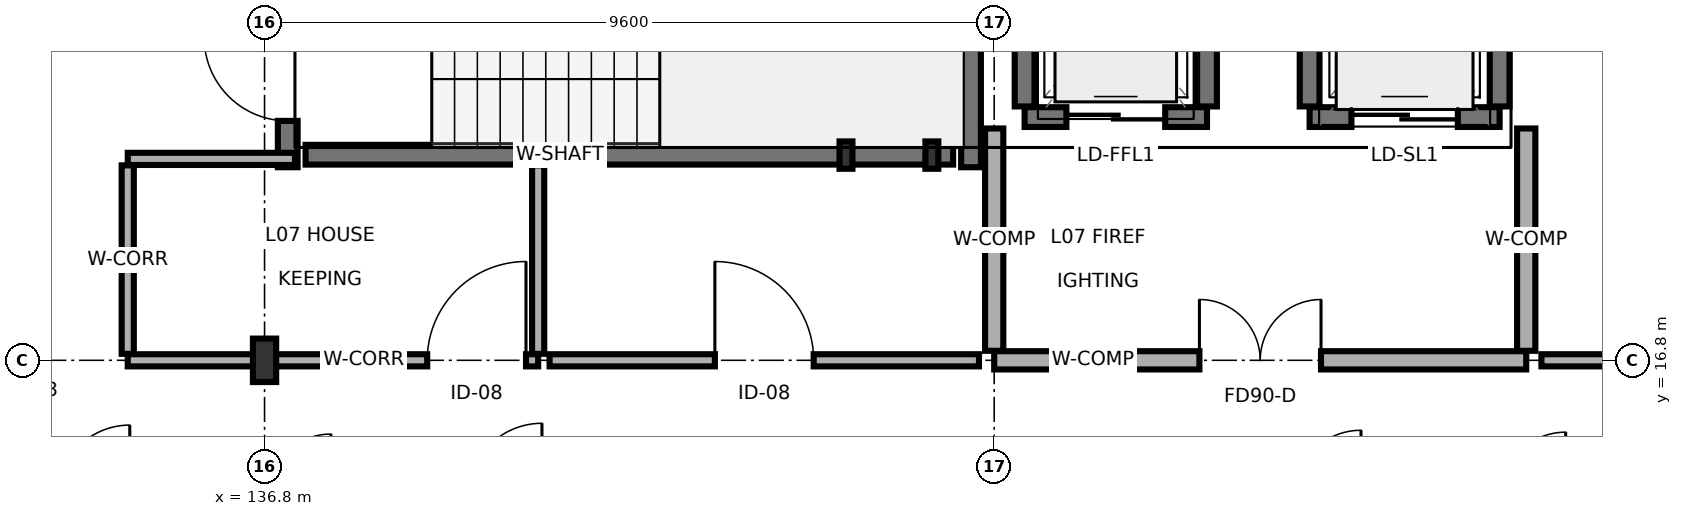
"""IFC4 building model, lengths in metres.
Left out: names, types, materials, properties, quantities, classifications, styles, units other than length and angle.
Written with IfcOpenShell. Run it as: python <this file> out.ifc"""

import sys

from ifc_helpers import new_model, si_unit, direction, frame, frame_2d, origin, origin_2d, place, context, subcontext, project, spatial, rectangle, i_section, extrude, element, fill, save


model = new_model("IFC4")
c1 = context("Model", 3, precision=1e-05, world=origin(), true_north=direction((0.0, 1.0)))
c2 = subcontext(c1, "Body", "Model", "MODEL_VIEW")
j1 = project(units=[si_unit("LENGTHUNIT", "METRE"), si_unit("PLANEANGLEUNIT", "RADIAN")], contexts=[c1])
p1 = place(None, origin())
s1 = spatial("IfcSite", under=j1, at=p1, CompositionType="ELEMENT")
p2 = place(p1, origin())
s2 = spatial("IfcBuilding", under=s1, at=p2, CompositionType="ELEMENT")
p3 = place(p2, frame((0.0, 0.0, 24.9)))
s3 = spatial("IfcBuildingStorey", under=s2, at=p3, CompositionType="ELEMENT", Elevation=24.9)
p4 = place(p3, frame((136.8, 16.8, 0.0), z_axis=(0.0, 0.0, 1.0), x_axis=(1.0, 0.0, 0.0)))
e1 = element("IfcColumn", 1, at=p4, inside=s3, PredefinedType="COLUMN", context=c2, shape_type="SweptSolid", body=[
    extrude(i_section(OverallWidth=0.306, OverallDepth=0.572, WebThickness=0.021, FlangeThickness=0.04, FilletRadius=0.027, at=origin_2d()), origin(), (0.0, 0.0, 1.0), 3.4),
])
for number, where, z_axis, x_axis in (
    (2, (144.45, 19.5, 0.0), (0.0, 0.0, 1.0), (1.0, 0.0, 0.0)),
    (3, (145.58, 19.5, 0.0), (0.0, 0.0, 1.0), (1.0, 0.0, 0.0)),
):
    element("IfcColumn", number, at=place(p3, frame(where, z_axis=z_axis, x_axis=x_axis)), inside=s3, PredefinedType="PILASTER", context=c2, shape_type="SweptSolid", body=[
        extrude(i_section(OverallWidth=0.17, OverallDepth=0.36, WebThickness=0.008, FlangeThickness=0.013, FilletRadius=0.018, at=origin_2d()), origin(), (0.0, 0.0, 1.0), 3.4),
    ])
p5 = place(p3, frame((137.105, 19.34, 0.0), z_axis=(0.0, 0.0, 1.0), x_axis=(0.0, 1.0, 0.0)))
e4 = element("IfcWall", 4, at=p5, inside=s3, PredefinedType="SHEAR", context=c2, shape_type="SweptSolid", body=[
    extrude(rectangle(XDim=4.27, YDim=0.26, at=frame_2d((2.135, 0.0))), origin(), (0.0, 0.0, 1.0), 3.19),
])
p6 = place(p5, frame((0.61, 0.0, 0.0)))
e5 = element("IfcOpeningElement", 5, at=p6, cuts=e4, PredefinedType="OPENING", context=c2, shape_type="SweptSolid", body=[
    extrude(rectangle(XDim=1.1, YDim=2.2, at=frame_2d((0.55, 1.1))), frame((0.0, 0.14, 0.0), z_axis=(0.0, -1.0, 0.0), x_axis=(1.0, 0.0, 0.0)), (0.0, 0.0, 1.0), 0.28),
])
p7 = place(p3, frame((146.095, 19.34, 0.0), z_axis=(0.0, 0.0, 1.0), x_axis=(0.0, 1.0, 0.0)))
e6 = element("IfcWall", 6, at=p7, inside=s3, PredefinedType="SHEAR", context=c2, shape_type="SweptSolid", body=[
    extrude(rectangle(XDim=4.27, YDim=0.26, at=frame_2d((2.135, 0.0))), origin(), (0.0, 0.0, 1.0), 3.19),
])
p8 = place(p3, frame((137.34, 19.505, 0.0), z_axis=(0.0, 0.0, 1.0), x_axis=(1.0, 0.0, 0.0)))
e7 = element("IfcWall", 7, at=p8, inside=s3, PredefinedType="SHEAR", context=c2, shape_type="SweptSolid", body=[
    extrude(rectangle(XDim=8.52, YDim=0.26, at=frame_2d((4.26, 0.0))), origin(), (0.0, 0.0, 1.0), 3.19),
])
p9 = place(p3, frame((146.8, 20.0, 0.0), z_axis=(0.0, 0.0, 1.0), x_axis=(1.0, 0.0, 0.0)))
e8 = element("IfcWall", 8, at=p9, inside=s3, PredefinedType="SHEAR", context=c2, shape_type="SweptSolid", body=[
    extrude(rectangle(XDim=2.4, YDim=0.26, at=frame_2d((1.2, 0.0))), origin(), (0.0, 0.0, 1.0), 3.19),
])
p10 = place(p9, frame((0.55, 0.0, 0.0)))
e9 = element("IfcOpeningElement", 9, at=p10, cuts=e8, PredefinedType="OPENING", context=c2, shape_type="SweptSolid", body=[
    extrude(rectangle(XDim=1.3, YDim=2.25, at=frame_2d((0.65, 1.125))), frame((0.0, 0.14, 0.0), z_axis=(0.0, -1.0, 0.0), x_axis=(1.0, 0.0, 0.0)), (0.0, 0.0, 1.0), 0.28),
])
for number, where, z_axis, x_axis in (
    (10, (146.8, 20.14, 0.0), (0.0, 0.0, 1.0), (0.0, 1.0, 0.0)),
    (11, (149.2, 20.14, 0.0), (0.0, 0.0, 1.0), (0.0, 1.0, 0.0)),
):
    element("IfcWall", number, at=place(p3, frame(where, z_axis=z_axis, x_axis=x_axis)), inside=s3, PredefinedType="SHEAR", context=c2, shape_type="SweptSolid", body=[
        extrude(rectangle(XDim=2.52, YDim=0.26, at=frame_2d((1.26, 0.0))), origin(), (0.0, 0.0, 1.0), 3.19),
    ])
p11 = place(p3, frame((150.55, 20.0, 0.0), z_axis=(0.0, 0.0, 1.0), x_axis=(1.0, 0.0, 0.0)))
e12 = element("IfcWall", 12, at=p11, inside=s3, PredefinedType="SHEAR", context=c2, shape_type="SweptSolid", body=[
    extrude(rectangle(XDim=2.5, YDim=0.26, at=frame_2d((1.25, 0.0))), origin(), (0.0, 0.0, 1.0), 3.19),
])
p12 = place(p11, frame((0.55, 0.0, 0.0)))
e13 = element("IfcOpeningElement", 13, at=p12, cuts=e12, PredefinedType="OPENING", context=c2, shape_type="SweptSolid", body=[
    extrude(rectangle(XDim=1.4, YDim=2.3, at=frame_2d((0.7, 1.15))), frame((0.0, 0.14, 0.0), z_axis=(0.0, -1.0, 0.0), x_axis=(1.0, 0.0, 0.0)), (0.0, 0.0, 1.0), 0.28),
])
for number, where, z_axis, x_axis in (
    (14, (150.55, 20.14, 0.0), (0.0, 0.0, 1.0), (0.0, 1.0, 0.0)),
    (15, (153.05, 20.14, 0.0), (0.0, 0.0, 1.0), (0.0, 1.0, 0.0)),
):
    element("IfcWall", number, at=place(p3, frame(where, z_axis=z_axis, x_axis=x_axis)), inside=s3, PredefinedType="SHEAR", context=c2, shape_type="SweptSolid", body=[
        extrude(rectangle(XDim=2.52, YDim=0.26, at=frame_2d((1.26, 0.0))), origin(), (0.0, 0.0, 1.0), 3.19),
    ])
p13 = place(p3, frame((146.4, 16.8, 0.0), z_axis=(0.0, 0.0, 1.0), x_axis=(1.0, 0.0, 0.0)))
e16 = element("IfcWall", 16, at=p13, inside=s3, PredefinedType="SOLIDWALL", context=c2, shape_type="SweptSolid", body=[
    extrude(rectangle(XDim=7.0, YDim=0.24, at=frame_2d((3.5, 0.0))), origin(), (0.0, 0.0, 1.0), 2.725),
])
p14 = place(p13, frame((2.7, 0.0, 0.0)))
e17 = element("IfcOpeningElement", 17, at=p14, cuts=e16, PredefinedType="OPENING", context=c2, shape_type="SweptSolid", body=[
    extrude(rectangle(XDim=1.6, YDim=2.2, at=frame_2d((0.8, 1.1))), frame((0.0, 0.13, 0.0), z_axis=(0.0, -1.0, 0.0), x_axis=(1.0, 0.0, 0.0)), (0.0, 0.0, 1.0), 0.26),
])
for number, where, z_axis, x_axis in (
    (18, (146.4, 16.925, 0.0), (0.0, 0.0, 1.0), (0.0, 1.0, 0.0)),
    (19, (153.4, 16.925, 0.0), (0.0, 0.0, 1.0), (0.0, 1.0, 0.0)),
):
    element("IfcWall", number, at=place(p3, frame(where, z_axis=z_axis, x_axis=x_axis)), inside=s3, PredefinedType="SOLIDWALL", context=c2, shape_type="SweptSolid", body=[
        extrude(rectangle(XDim=2.925, YDim=0.24, at=frame_2d((1.462, 0.0))), origin(), (0.0, 0.0, 1.0), 2.725),
    ])
p15 = place(p3, frame((135.0, 16.8, 0.0), z_axis=(0.0, 0.0, 1.0), x_axis=(1.0, 0.0, 0.0)))
e20 = element("IfcWall", 20, at=p15, inside=s3, PredefinedType="PARTITIONING", context=c2, shape_type="SweptSolid", body=[
    extrude(rectangle(XDim=5.4, YDim=0.16, at=frame_2d((2.7, 0.0))), origin(), (0.0, 0.0, 1.0), 2.725),
])
p16 = place(p15, frame((3.94, 0.0, 0.0)))
e21 = element("IfcOpeningElement", 21, at=p16, cuts=e20, PredefinedType="OPENING", context=c2, shape_type="SweptSolid", body=[
    extrude(rectangle(XDim=1.3, YDim=2.2, at=frame_2d((0.65, 1.1))), frame((0.0, 0.09, 0.0), z_axis=(0.0, -1.0, 0.0), x_axis=(1.0, 0.0, 0.0)), (0.0, 0.0, 1.0), 0.18),
])
for number, where, z_axis, x_axis in (
    (22, (135.0, 16.885, 0.0), (0.0, 0.0, 1.0), (0.0, 1.0, 0.0)),
    (23, (140.4, 16.885, 0.0), (0.0, 0.0, 1.0), (0.0, 1.0, 0.0)),
):
    element("IfcWall", number, at=place(p3, frame(where, z_axis=z_axis, x_axis=x_axis)), inside=s3, PredefinedType="PARTITIONING", context=c2, shape_type="SweptSolid", body=[
        extrude(rectangle(XDim=2.48, YDim=0.16, at=frame_2d((1.24, 0.0))), origin(), (0.0, 0.0, 1.0), 2.725),
    ])
p17 = place(p3, frame((135.0, 19.45, 0.0), z_axis=(0.0, 0.0, 1.0), x_axis=(1.0, 0.0, 0.0)))
e24 = element("IfcWall", 24, at=p17, inside=s3, PredefinedType="PARTITIONING", context=c2, shape_type="SweptSolid", body=[
    extrude(rectangle(XDim=2.2, YDim=0.16, at=frame_2d((1.1, 0.0))), origin(), (0.0, 0.0, 1.0), 2.725),
])
p18 = place(p3, frame((140.55, 16.8, 0.0), z_axis=(0.0, 0.0, 1.0), x_axis=(1.0, 0.0, 0.0)))
e25 = element("IfcWall", 25, at=p18, inside=s3, PredefinedType="PARTITIONING", context=c2, shape_type="SweptSolid", body=[
    extrude(rectangle(XDim=5.65, YDim=0.16, at=frame_2d((2.825, 0.0))), origin(), (0.0, 0.0, 1.0), 2.725),
])
p19 = place(p18, frame((2.175, 0.0, 0.0)))
e26 = element("IfcOpeningElement", 26, at=p19, cuts=e25, PredefinedType="OPENING", context=c2, shape_type="SweptSolid", body=[
    extrude(rectangle(XDim=1.3, YDim=2.2, at=frame_2d((0.65, 1.1))), frame((0.0, 0.09, 0.0), z_axis=(0.0, -1.0, 0.0), x_axis=(1.0, 0.0, 0.0)), (0.0, 0.0, 1.0), 0.18),
])
p20 = place(p3, frame((153.6, 16.8, 0.0), z_axis=(0.0, 0.0, 1.0), x_axis=(1.0, 0.0, 0.0)))
e27 = element("IfcWall", 27, at=p20, inside=s3, PredefinedType="PARTITIONING", context=c2, shape_type="SweptSolid", body=[
    extrude(rectangle(XDim=1.8, YDim=0.16, at=frame_2d((0.9, 0.0))), origin(), (0.0, 0.0, 1.0), 2.725),
])
p21 = place(p6, origin())
e28 = element("IfcDoor", 28, at=p21, inside=s3, OperationType="SINGLE_SWING_RIGHT", PredefinedType="DOOR", context=c2, shape_type="SweptSolid", body=[
    extrude(rectangle(XDim=1.1, YDim=2.2, at=frame_2d((0.55, 1.1))), frame((0.0, 0.025, 0.0), z_axis=(0.0, -1.0, 0.0), x_axis=(1.0, 0.0, 0.0)), (0.0, 0.0, 1.0), 0.05),
])
fill(e5, e28)
p22 = place(p10, origin())
e29 = element("IfcDoor", 29, at=p22, inside=s3, OperationType="SLIDING_TO_RIGHT", PredefinedType="DOOR", context=c2, shape_type="SweptSolid", body=[
    extrude(rectangle(XDim=1.3, YDim=2.25, at=frame_2d((0.65, 1.125))), frame((0.0, 0.025, 0.0), z_axis=(0.0, -1.0, 0.0), x_axis=(1.0, 0.0, 0.0)), (0.0, 0.0, 1.0), 0.05),
])
fill(e9, e29)
p23 = place(p12, origin())
e30 = element("IfcDoor", 30, at=p23, inside=s3, OperationType="SLIDING_TO_LEFT", PredefinedType="DOOR", context=c2, shape_type="SweptSolid", body=[
    extrude(rectangle(XDim=1.4, YDim=2.3, at=frame_2d((0.7, 1.15))), frame((0.0, 0.025, 0.0), z_axis=(0.0, -1.0, 0.0), x_axis=(1.0, 0.0, 0.0)), (0.0, 0.0, 1.0), 0.05),
])
fill(e13, e30)
p24 = place(p14, origin())
e31 = element("IfcDoor", 31, at=p24, inside=s3, OperationType="DOUBLE_DOOR_SINGLE_SWING", PredefinedType="DOOR", context=c2, shape_type="SweptSolid", body=[
    extrude(rectangle(XDim=1.6, YDim=2.2, at=frame_2d((0.8, 1.1))), frame((0.0, 0.025, 0.0), z_axis=(0.0, -1.0, 0.0), x_axis=(1.0, 0.0, 0.0)), (0.0, 0.0, 1.0), 0.05),
])
fill(e17, e31)
p25 = place(p16, origin())
e32 = element("IfcDoor", 32, at=p25, inside=s3, OperationType="SINGLE_SWING_RIGHT", PredefinedType="DOOR", context=c2, shape_type="SweptSolid", body=[
    extrude(rectangle(XDim=1.3, YDim=2.2, at=frame_2d((0.65, 1.1))), frame((0.0, 0.025, 0.0), z_axis=(0.0, -1.0, 0.0), x_axis=(1.0, 0.0, 0.0)), (0.0, 0.0, 1.0), 0.05),
])
fill(e21, e32)
p26 = place(p19, origin())
e33 = element("IfcDoor", 33, at=p26, inside=s3, OperationType="SINGLE_SWING_LEFT", PredefinedType="DOOR", context=c2, shape_type="SweptSolid", body=[
    extrude(rectangle(XDim=1.3, YDim=2.2, at=frame_2d((0.65, 1.1))), frame((0.0, 0.025, 0.0), z_axis=(0.0, -1.0, 0.0), x_axis=(1.0, 0.0, 0.0)), (0.0, 0.0, 1.0), 0.05),
])
fill(e26, e33)
save(model, sys.argv[1])
